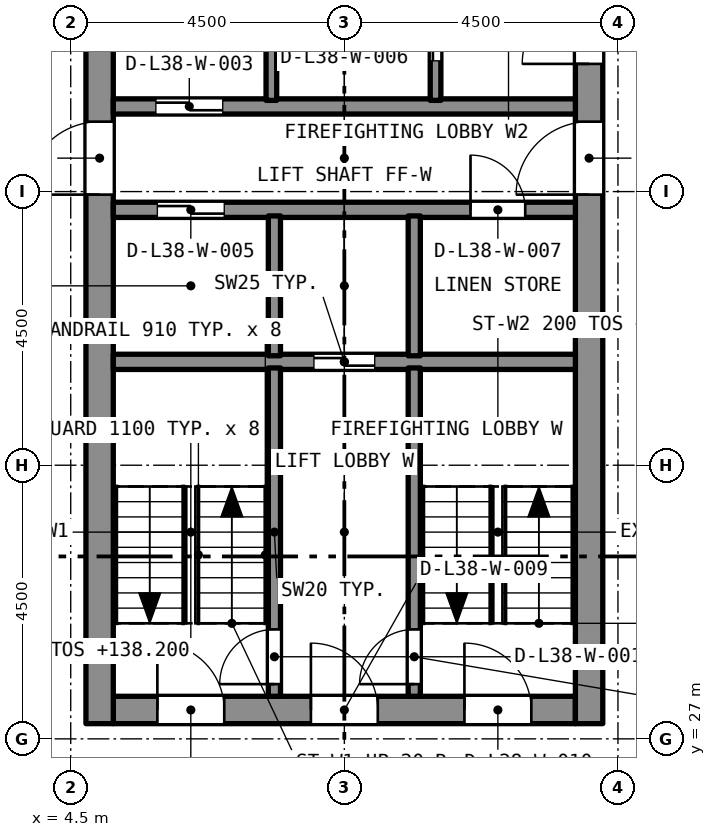
"""IFC4 building model, lengths in metres.
Left out: names, types, materials, properties, quantities, classifications, styles, units other than length and angle.
Written with IfcOpenShell. Run it as: python <this file> out.ifc"""

import sys

from ifc_helpers import new_model, si_unit, direction, frame, frame_2d, origin, place, context, subcontext, project, spatial, rectangle, extrude, element, fill, save


model = new_model("IFC4")
c1 = context("Model", 3, precision=1e-05, world=origin(), true_north=direction((0.0, 1.0)))
c2 = subcontext(c1, "Body", "Model", "MODEL_VIEW")
j1 = project(units=[si_unit("LENGTHUNIT", "METRE"), si_unit("PLANEANGLEUNIT", "RADIAN")], contexts=[c1])
p1 = place(None, origin())
s1 = spatial("IfcSite", under=j1, at=p1, CompositionType="ELEMENT")
p2 = place(p1, origin())
s2 = spatial("IfcBuilding", under=s1, at=p2, CompositionType="ELEMENT")
p3 = place(p2, frame((0.0, 0.0, 136.6)))
s3 = spatial("IfcBuildingStorey", under=s2, at=p3, CompositionType="ELEMENT", Elevation=136.6)
p4 = place(p3, frame((5.2, 27.475, 0.0), z_axis=(0.0, 0.0, 1.0), x_axis=(1.0, 0.0, 0.0)))
e1 = element("IfcWall", 1, at=p4, inside=s3, PredefinedType="SOLIDWALL", context=c2, shape_type="SweptSolid", body=[
    extrude(rectangle(XDim=7.6, YDim=0.45, at=frame_2d((3.8, 0.0))), origin(), (0.0, 0.0, 1.0), 3.2),
])
p5 = place(p4, frame((0.725, 0.0, 0.0)))
e2 = element("IfcOpeningElement", 2, at=p5, cuts=e1, PredefinedType="OPENING", context=c2, shape_type="SweptSolid", body=[
    extrude(rectangle(XDim=1.1, YDim=2.1, at=frame_2d((0.55, 1.05))), frame((0.0, 0.235, 0.0), z_axis=(0.0, -1.0, 0.0), x_axis=(1.0, 0.0, 0.0)), (0.0, 0.0, 1.0), 0.47),
])
p6 = place(p4, frame((3.25, 0.0, 0.0)))
e3 = element("IfcOpeningElement", 3, at=p6, cuts=e1, PredefinedType="OPENING", context=c2, shape_type="SweptSolid", body=[
    extrude(rectangle(XDim=1.1, YDim=2.1, at=frame_2d((0.55, 1.05))), frame((0.0, 0.235, 0.0), z_axis=(0.0, -1.0, 0.0), x_axis=(1.0, 0.0, 0.0)), (0.0, 0.0, 1.0), 0.47),
])
p7 = place(p4, frame((5.775, 0.0, 0.0)))
e4 = element("IfcOpeningElement", 4, at=p7, cuts=e1, PredefinedType="OPENING", context=c2, shape_type="SweptSolid", body=[
    extrude(rectangle(XDim=1.1, YDim=2.1, at=frame_2d((0.55, 1.05))), frame((0.0, 0.235, 0.0), z_axis=(0.0, -1.0, 0.0), x_axis=(1.0, 0.0, 0.0)), (0.0, 0.0, 1.0), 0.47),
])
p8 = place(p3, frame((4.975, 27.25, 0.0), z_axis=(0.0, 0.0, 1.0), x_axis=(0.0, 1.0, 0.0)))
e5 = element("IfcWall", 5, at=p8, inside=s3, PredefinedType="SOLIDWALL", context=c2, shape_type="SweptSolid", body=[
    extrude(rectangle(XDim=13.0, YDim=0.45, at=frame_2d((6.5, 0.0))), origin(), (0.0, 0.0, 1.0), 3.2),
])
p9 = place(p8, frame((8.7, 0.0, 0.0)))
e6 = element("IfcOpeningElement", 6, at=p9, cuts=e5, PredefinedType="OPENING", context=c2, shape_type="SweptSolid", body=[
    extrude(rectangle(XDim=1.2, YDim=2.1, at=frame_2d((0.6, 1.05))), frame((0.0, 0.235, 0.0), z_axis=(0.0, -1.0, 0.0), x_axis=(1.0, 0.0, 0.0)), (0.0, 0.0, 1.0), 0.47),
])
p10 = place(p3, frame((13.025, 27.25, 0.0), z_axis=(0.0, 0.0, 1.0), x_axis=(0.0, 1.0, 0.0)))
e7 = element("IfcWall", 7, at=p10, inside=s3, PredefinedType="SOLIDWALL", context=c2, shape_type="SweptSolid", body=[
    extrude(rectangle(XDim=13.0, YDim=0.45, at=frame_2d((6.5, 0.0))), origin(), (0.0, 0.0, 1.0), 3.2),
])
p11 = place(p10, frame((10.85, 0.0, 0.0)))
e8 = element("IfcOpeningElement", 8, at=p11, cuts=e7, PredefinedType="OPENING", context=c2, shape_type="SweptSolid", body=[
    extrude(rectangle(XDim=1.1, YDim=2.1, at=frame_2d((0.55, 1.05))), frame((0.0, 0.235, 0.0), z_axis=(0.0, -1.0, 0.0), x_axis=(1.0, 0.0, 0.0)), (0.0, 0.0, 1.0), 0.47),
])
p12 = place(p10, frame((8.7, 0.0, 0.0)))
e9 = element("IfcOpeningElement", 9, at=p12, cuts=e7, PredefinedType="OPENING", context=c2, shape_type="SweptSolid", body=[
    extrude(rectangle(XDim=1.2, YDim=2.1, at=frame_2d((0.6, 1.05))), frame((0.0, 0.235, 0.0), z_axis=(0.0, -1.0, 0.0), x_axis=(1.0, 0.0, 0.0)), (0.0, 0.0, 1.0), 0.47),
])
p13 = place(p3, frame((5.2, 33.2, 0.0), z_axis=(0.0, 0.0, 1.0), x_axis=(1.0, 0.0, 0.0)))
e10 = element("IfcWall", 10, at=p13, inside=s3, PredefinedType="SOLIDWALL", context=c2, shape_type="SweptSolid", body=[
    extrude(rectangle(XDim=7.6, YDim=0.25, at=frame_2d((3.8, 0.0))), origin(), (0.0, 0.0, 1.0), 2.9),
])
p14 = place(p13, frame((3.3, 0.0, 0.0)))
e11 = element("IfcOpeningElement", 11, at=p14, cuts=e10, PredefinedType="OPENING", context=c2, shape_type="SweptSolid", body=[
    extrude(rectangle(XDim=1.0, YDim=2.1, at=frame_2d((0.5, 1.05))), frame((0.0, 0.135, 0.0), z_axis=(0.0, -1.0, 0.0), x_axis=(1.0, 0.0, 0.0)), (0.0, 0.0, 1.0), 0.27),
])
p15 = place(p3, frame((5.2, 35.7, 0.0), z_axis=(0.0, 0.0, 1.0), x_axis=(1.0, 0.0, 0.0)))
e12 = element("IfcWall", 12, at=p15, inside=s3, PredefinedType="SOLIDWALL", context=c2, shape_type="SweptSolid", body=[
    extrude(rectangle(XDim=7.6, YDim=0.25, at=frame_2d((3.8, 0.0))), origin(), (0.0, 0.0, 1.0), 2.9),
])
p16 = place(p15, frame((0.725, 0.0, 0.0)))
e13 = element("IfcOpeningElement", 13, at=p16, cuts=e12, PredefinedType="OPENING", context=c2, shape_type="SweptSolid", body=[
    extrude(rectangle(XDim=1.1, YDim=2.4, at=frame_2d((0.55, 1.2))), frame((0.0, 0.135, 0.0), z_axis=(0.0, -1.0, 0.0), x_axis=(1.0, 0.0, 0.0)), (0.0, 0.0, 1.0), 0.27),
])
p17 = place(p15, frame((5.875, 0.0, 0.0)))
e14 = element("IfcOpeningElement", 14, at=p17, cuts=e12, PredefinedType="OPENING", context=c2, shape_type="SweptSolid", body=[
    extrude(rectangle(XDim=0.9, YDim=2.1, at=frame_2d((0.45, 1.05))), frame((0.0, 0.135, 0.0), z_axis=(0.0, -1.0, 0.0), x_axis=(1.0, 0.0, 0.0)), (0.0, 0.0, 1.0), 0.27),
])
p18 = place(p3, frame((5.2, 37.4, 0.0), z_axis=(0.0, 0.0, 1.0), x_axis=(1.0, 0.0, 0.0)))
e15 = element("IfcWall", 15, at=p18, inside=s3, PredefinedType="SOLIDWALL", context=c2, shape_type="SweptSolid", body=[
    extrude(rectangle(XDim=7.6, YDim=0.25, at=frame_2d((3.8, 0.0))), origin(), (0.0, 0.0, 1.0), 2.9),
])
p19 = place(p18, frame((0.7, 0.0, 0.0)))
e16 = element("IfcOpeningElement", 16, at=p19, cuts=e15, PredefinedType="OPENING", context=c2, shape_type="SweptSolid", body=[
    extrude(rectangle(XDim=1.1, YDim=2.4, at=frame_2d((0.55, 1.2))), frame((0.0, 0.135, 0.0), z_axis=(0.0, -1.0, 0.0), x_axis=(1.0, 0.0, 0.0)), (0.0, 0.0, 1.0), 0.27),
])
p20 = place(p3, frame((7.85, 27.7, 0.0), z_axis=(0.0, 0.0, 1.0), x_axis=(0.0, 1.0, 0.0)))
e17 = element("IfcWall", 17, at=p20, inside=s3, PredefinedType="SOLIDWALL", context=c2, shape_type="SweptSolid", body=[
    extrude(rectangle(XDim=5.4, YDim=0.2, at=frame_2d((2.7, 0.0))), origin(), (0.0, 0.0, 1.0), 2.9),
])
p21 = place(p20, frame((0.2, 0.0, 0.0)))
e18 = element("IfcOpeningElement", 18, at=p21, cuts=e17, PredefinedType="OPENING", context=c2, shape_type="SweptSolid", body=[
    extrude(rectangle(XDim=0.9, YDim=2.1, at=frame_2d((0.45, 1.05))), frame((0.0, 0.11, 0.0), z_axis=(0.0, -1.0, 0.0), x_axis=(1.0, 0.0, 0.0)), (0.0, 0.0, 1.0), 0.22),
])
p22 = place(p3, frame((10.15, 27.7, 0.0), z_axis=(0.0, 0.0, 1.0), x_axis=(0.0, 1.0, 0.0)))
e19 = element("IfcWall", 19, at=p22, inside=s3, PredefinedType="SOLIDWALL", context=c2, shape_type="SweptSolid", body=[
    extrude(rectangle(XDim=5.4, YDim=0.2, at=frame_2d((2.7, 0.0))), origin(), (0.0, 0.0, 1.0), 2.9),
])
p23 = place(p22, frame((0.2, 0.0, 0.0)))
e20 = element("IfcOpeningElement", 20, at=p23, cuts=e19, PredefinedType="OPENING", context=c2, shape_type="SweptSolid", body=[
    extrude(rectangle(XDim=0.9, YDim=2.1, at=frame_2d((0.45, 1.05))), frame((0.0, 0.11, 0.0), z_axis=(0.0, -1.0, 0.0), x_axis=(1.0, 0.0, 0.0)), (0.0, 0.0, 1.0), 0.22),
])
for number, where, z_axis, x_axis in (
    (21, (7.85, 33.3, 0.0), (0.0, 0.0, 1.0), (0.0, 1.0, 0.0)),
    (22, (10.15, 33.3, 0.0), (0.0, 0.0, 1.0), (0.0, 1.0, 0.0)),
):
    element("IfcWall", number, at=place(p3, frame(where, z_axis=z_axis, x_axis=x_axis)), inside=s3, PredefinedType="SOLIDWALL", context=c2, shape_type="SweptSolid", body=[
        extrude(rectangle(XDim=2.3, YDim=0.2, at=frame_2d((1.15, 0.0))), origin(), (0.0, 0.0, 1.0), 2.9),
    ])
p24 = place(p3, frame((7.8, 37.5, 0.0), z_axis=(0.0, 0.0, 1.0), x_axis=(0.0, 1.0, 0.0)))
e23 = element("IfcWall", 23, at=p24, inside=s3, PredefinedType="SOLIDWALL", context=c2, shape_type="SweptSolid", body=[
    extrude(rectangle(XDim=2.3, YDim=0.175, at=frame_2d((1.15, 0.0))), origin(), (0.0, 0.0, 1.0), 2.9),
])
p25 = place(p3, frame((10.5, 37.5, 0.0), z_axis=(0.0, 0.0, 1.0), x_axis=(0.0, 1.0, 0.0)))
e24 = element("IfcWall", 24, at=p25, inside=s3, PredefinedType="SOLIDWALL", context=c2, shape_type="SweptSolid", body=[
    extrude(rectangle(XDim=2.3, YDim=0.175, at=frame_2d((1.15, 0.0))), origin(), (0.0, 0.0, 1.0), 2.9),
])
p26 = place(p25, frame((0.65, 0.0, 0.0)))
e25 = element("IfcOpeningElement", 25, at=p26, cuts=e24, PredefinedType="OPENING", context=c2, shape_type="SweptSolid", body=[
    extrude(rectangle(XDim=1.0, YDim=2.1, at=frame_2d((0.5, 1.05))), frame((0.0, 0.097, 0.0), z_axis=(0.0, -1.0, 0.0), x_axis=(1.0, 0.0, 0.0)), (0.0, 0.0, 1.0), 0.195),
])
p27 = place(p21, origin())
e26 = element("IfcDoor", 26, at=p27, inside=s3, OperationType="SINGLE_SWING_LEFT", PredefinedType="DOOR", context=c2, shape_type="SweptSolid", body=[
    extrude(rectangle(XDim=0.9, YDim=2.1, at=frame_2d((0.45, 1.05))), frame((0.0, 0.025, 0.0), z_axis=(0.0, -1.0, 0.0), x_axis=(1.0, 0.0, 0.0)), (0.0, 0.0, 1.0), 0.05),
])
fill(e18, e26)
p28 = place(p23, origin())
e27 = element("IfcDoor", 27, at=p28, inside=s3, OperationType="SINGLE_SWING_LEFT", PredefinedType="DOOR", context=c2, shape_type="SweptSolid", body=[
    extrude(rectangle(XDim=0.9, YDim=2.1, at=frame_2d((0.45, 1.05))), frame((0.0, 0.025, 0.0), z_axis=(0.0, -1.0, 0.0), x_axis=(1.0, 0.0, 0.0)), (0.0, 0.0, 1.0), 0.05),
])
fill(e20, e27)
p29 = place(p19, origin())
e28 = element("IfcDoor", 28, at=p29, inside=s3, OperationType="SLIDING_TO_LEFT", PredefinedType="DOOR", context=c2, shape_type="SweptSolid", body=[
    extrude(rectangle(XDim=1.1, YDim=2.4, at=frame_2d((0.55, 1.2))), frame((0.0, 0.025, 0.0), z_axis=(0.0, -1.0, 0.0), x_axis=(1.0, 0.0, 0.0)), (0.0, 0.0, 1.0), 0.05),
])
fill(e16, e28)
p30 = place(p26, origin())
e29 = element("IfcDoor", 29, at=p30, inside=s3, OperationType="SLIDING_TO_LEFT", PredefinedType="DOOR", context=c2, shape_type="SweptSolid", body=[
    extrude(rectangle(XDim=1.0, YDim=2.1, at=frame_2d((0.5, 1.05))), frame((0.0, 0.025, 0.0), z_axis=(0.0, -1.0, 0.0), x_axis=(1.0, 0.0, 0.0)), (0.0, 0.0, 1.0), 0.05),
])
fill(e25, e29)
p31 = place(p16, origin())
e30 = element("IfcDoor", 30, at=p31, inside=s3, OperationType="SLIDING_TO_LEFT", PredefinedType="DOOR", context=c2, shape_type="SweptSolid", body=[
    extrude(rectangle(XDim=1.1, YDim=2.4, at=frame_2d((0.55, 1.2))), frame((0.0, 0.025, 0.0), z_axis=(0.0, -1.0, 0.0), x_axis=(1.0, 0.0, 0.0)), (0.0, 0.0, 1.0), 0.05),
])
fill(e13, e30)
p32 = place(p14, origin())
e31 = element("IfcDoor", 31, at=p32, inside=s3, OperationType="SLIDING_TO_LEFT", PredefinedType="DOOR", context=c2, shape_type="SweptSolid", body=[
    extrude(rectangle(XDim=1.0, YDim=2.1, at=frame_2d((0.5, 1.05))), frame((0.0, 0.025, 0.0), z_axis=(0.0, -1.0, 0.0), x_axis=(1.0, 0.0, 0.0)), (0.0, 0.0, 1.0), 0.05),
])
fill(e11, e31)
p33 = place(p17, origin())
e32 = element("IfcDoor", 32, at=p33, inside=s3, OperationType="SINGLE_SWING_LEFT", PredefinedType="DOOR", context=c2, shape_type="SweptSolid", body=[
    extrude(rectangle(XDim=0.9, YDim=2.1, at=frame_2d((0.45, 1.05))), frame((0.0, 0.025, 0.0), z_axis=(0.0, -1.0, 0.0), x_axis=(1.0, 0.0, 0.0)), (0.0, 0.0, 1.0), 0.05),
])
fill(e14, e32)
p34 = place(p5, origin())
e33 = element("IfcDoor", 33, at=p34, inside=s3, OperationType="SINGLE_SWING_LEFT", PredefinedType="DOOR", context=c2, shape_type="SweptSolid", body=[
    extrude(rectangle(XDim=1.1, YDim=2.1, at=frame_2d((0.55, 1.05))), frame((0.0, 0.025, 0.0), z_axis=(0.0, -1.0, 0.0), x_axis=(1.0, 0.0, 0.0)), (0.0, 0.0, 1.0), 0.05),
])
fill(e2, e33)
p35 = place(p6, origin())
e34 = element("IfcDoor", 34, at=p35, inside=s3, OperationType="SINGLE_SWING_LEFT", PredefinedType="DOOR", context=c2, shape_type="SweptSolid", body=[
    extrude(rectangle(XDim=1.1, YDim=2.1, at=frame_2d((0.55, 1.05))), frame((0.0, 0.025, 0.0), z_axis=(0.0, -1.0, 0.0), x_axis=(1.0, 0.0, 0.0)), (0.0, 0.0, 1.0), 0.05),
])
fill(e3, e34)
p36 = place(p7, origin())
e35 = element("IfcDoor", 35, at=p36, inside=s3, OperationType="SINGLE_SWING_LEFT", PredefinedType="DOOR", context=c2, shape_type="SweptSolid", body=[
    extrude(rectangle(XDim=1.1, YDim=2.1, at=frame_2d((0.55, 1.05))), frame((0.0, 0.025, 0.0), z_axis=(0.0, -1.0, 0.0), x_axis=(1.0, 0.0, 0.0)), (0.0, 0.0, 1.0), 0.05),
])
fill(e4, e35)
p37 = place(p11, origin())
e36 = element("IfcDoor", 36, at=p37, inside=s3, OperationType="SINGLE_SWING_LEFT", PredefinedType="DOOR", context=c2, shape_type="SweptSolid", body=[
    extrude(rectangle(XDim=1.1, YDim=2.1, at=frame_2d((0.55, 1.05))), frame((0.0, 0.025, 0.0), z_axis=(0.0, -1.0, 0.0), x_axis=(1.0, 0.0, 0.0)), (0.0, 0.0, 1.0), 0.05),
])
fill(e8, e36)
p38 = place(p9, origin())
e37 = element("IfcDoor", 37, at=p38, inside=s3, OperationType="SINGLE_SWING_LEFT", PredefinedType="DOOR", context=c2, shape_type="SweptSolid", body=[
    extrude(rectangle(XDim=1.2, YDim=2.1, at=frame_2d((0.6, 1.05))), frame((0.0, 0.025, 0.0), z_axis=(0.0, -1.0, 0.0), x_axis=(1.0, 0.0, 0.0)), (0.0, 0.0, 1.0), 0.05),
])
fill(e6, e37)
p39 = place(p12, origin())
e38 = element("IfcDoor", 38, at=p39, inside=s3, OperationType="SINGLE_SWING_LEFT", PredefinedType="DOOR", context=c2, shape_type="SweptSolid", body=[
    extrude(rectangle(XDim=1.2, YDim=2.1, at=frame_2d((0.6, 1.05))), frame((0.0, 0.025, 0.0), z_axis=(0.0, -1.0, 0.0), x_axis=(1.0, 0.0, 0.0)), (0.0, 0.0, 1.0), 0.05),
])
fill(e9, e38)
save(model, sys.argv[1])
